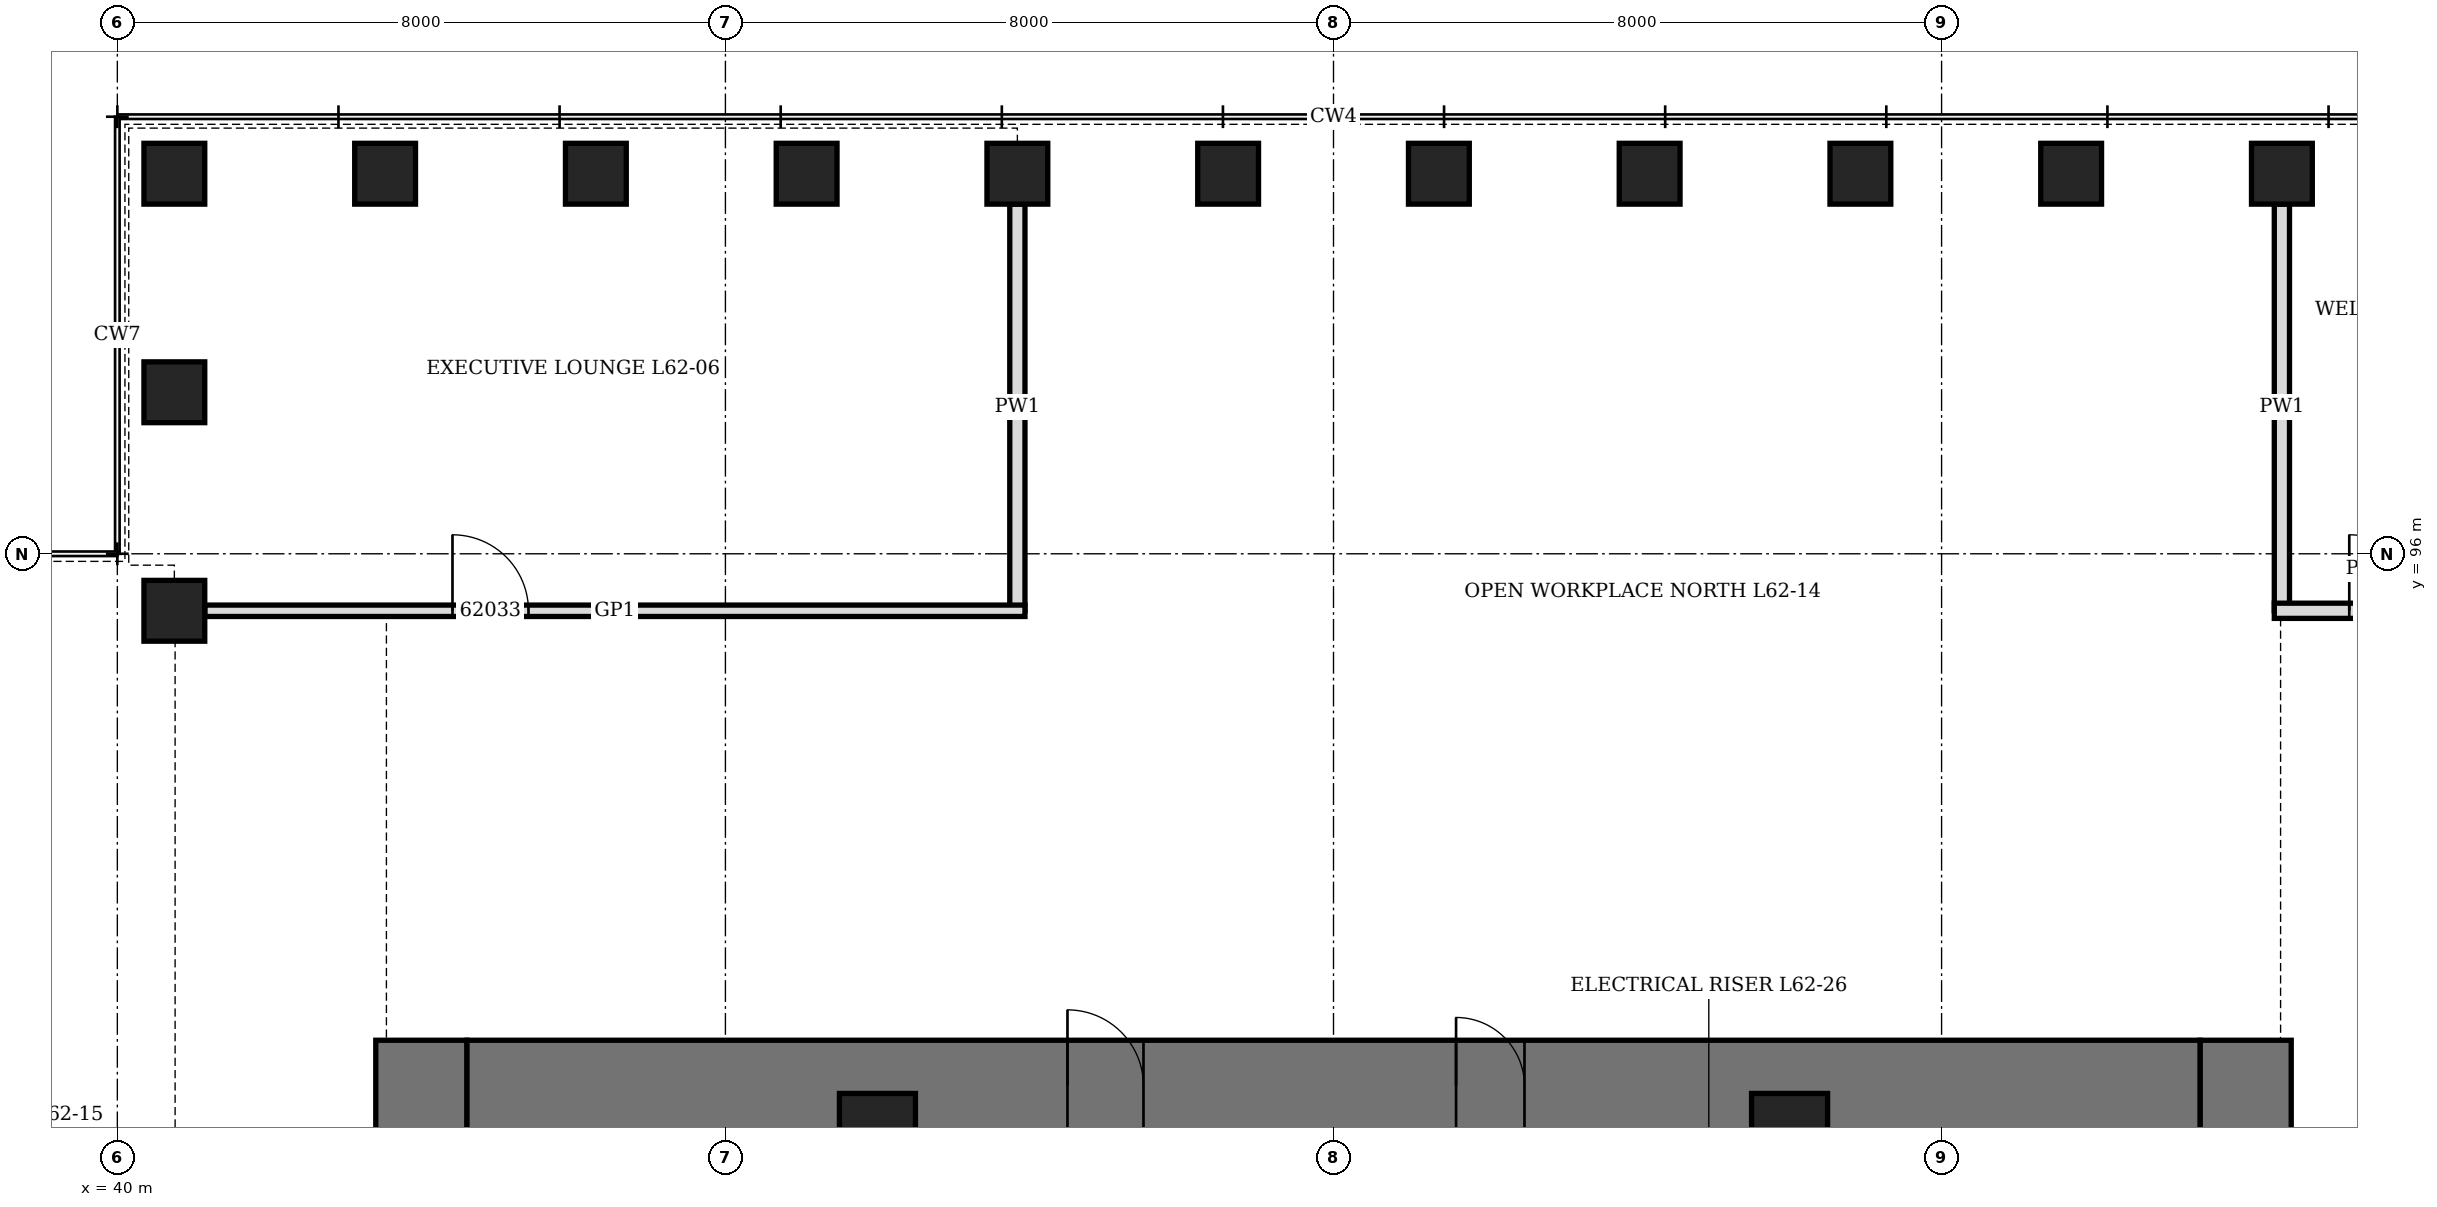
"""IFC4 building model, lengths in metres.
Left out: names, types, materials, properties, quantities, classifications, styles, units other than length and angle.
Written with IfcOpenShell. Run it as: python <this file> out.ifc"""

import sys

from ifc_helpers import new_model, si_unit, direction, frame, frame_2d, origin, origin_2d, place, context, subcontext, project, spatial, rectangle, hollow_rectangle, extrude, element, fill, save


model = new_model("IFC4")
c1 = context("Model", 3, precision=1e-05, world=origin(), true_north=direction((0.0, 1.0)))
c2 = subcontext(c1, "Body", "Model", "MODEL_VIEW")
j1 = project(units=[si_unit("LENGTHUNIT", "METRE"), si_unit("PLANEANGLEUNIT", "RADIAN")], contexts=[c1])
p1 = place(None, origin())
s1 = spatial("IfcSite", under=j1, at=p1, CompositionType="ELEMENT")
p2 = place(p1, origin())
s2 = spatial("IfcBuilding", under=s1, at=p2, CompositionType="ELEMENT")
p3 = place(p2, frame((0.0, 0.0, 275.5)))
s3 = spatial("IfcBuildingStorey", under=s2, at=p3, CompositionType="ELEMENT", Elevation=275.5)
for number, where, z_axis, x_axis in (
    (1, (68.477, 101.0, 0.0), (0.0, 0.0, 1.0), (1.0, 0.0, 0.0)),
    (2, (65.705, 101.0, 0.0), (0.0, 0.0, 1.0), (1.0, 0.0, 0.0)),
    (3, (62.932, 101.0, 0.0), (0.0, 0.0, 1.0), (1.0, 0.0, 0.0)),
    (4, (60.159, 101.0, 0.0), (0.0, 0.0, 1.0), (1.0, 0.0, 0.0)),
    (5, (57.386, 101.0, 0.0), (0.0, 0.0, 1.0), (1.0, 0.0, 0.0)),
    (6, (54.614, 101.0, 0.0), (0.0, 0.0, 1.0), (1.0, 0.0, 0.0)),
    (7, (51.841, 101.0, 0.0), (0.0, 0.0, 1.0), (1.0, 0.0, 0.0)),
    (8, (49.068, 101.0, 0.0), (0.0, 0.0, 1.0), (1.0, 0.0, 0.0)),
    (9, (46.295, 101.0, 0.0), (0.0, 0.0, 1.0), (1.0, 0.0, 0.0)),
    (10, (43.523, 101.0, 0.0), (0.0, 0.0, 1.0), (1.0, 0.0, 0.0)),
    (11, (40.75, 101.0, 0.0), (0.0, 0.0, 1.0), (0.0, 1.0, 0.0)),
    (12, (40.75, 98.125, 0.0), (0.0, 0.0, 1.0), (0.0, 1.0, 0.0)),
    (13, (40.75, 95.25, 0.0), (0.0, 0.0, 1.0), (1.0, 0.0, 0.0)),
):
    element("IfcColumn", number, at=place(p3, frame(where, z_axis=z_axis, x_axis=x_axis)), inside=s3, PredefinedType="COLUMN", context=c2, shape_type="SweptSolid", body=[
        extrude(hollow_rectangle(XDim=0.8, YDim=0.8, WallThickness=0.1, at=origin_2d()), origin(), (0.0, 0.0, 1.0), 3.95),
    ])
p4 = place(p3, frame((44.0, 70.4, 0.0), z_axis=(0.0, 0.0, 1.0), x_axis=(0.0, 1.0, 0.0)))
e14 = element("IfcWall", 14, at=p4, inside=s3, PredefinedType="SHEAR", context=c2, shape_type="SweptSolid", body=[
    extrude(rectangle(XDim=19.2, YDim=1.2, at=frame_2d((9.6, 0.0))), origin(), (0.0, 0.0, 1.0), 4.2),
])
p5 = place(p4, frame((8.6, 0.0, 0.0)))
e15 = element("IfcOpeningElement", 15, at=p5, cuts=e14, PredefinedType="OPENING", context=c2, shape_type="SweptSolid", body=[
    extrude(rectangle(XDim=2.0, YDim=2.4, at=frame_2d((1.0, 1.2))), frame((0.0, 0.61, 0.0), z_axis=(0.0, -1.0, 0.0), x_axis=(1.0, 0.0, 0.0)), (0.0, 0.0, 1.0), 1.22),
])
p6 = place(p3, frame((68.0, 70.4, 0.0), z_axis=(0.0, 0.0, 1.0), x_axis=(0.0, 1.0, 0.0)))
e16 = element("IfcWall", 16, at=p6, inside=s3, PredefinedType="SHEAR", context=c2, shape_type="SweptSolid", body=[
    extrude(rectangle(XDim=19.2, YDim=1.2, at=frame_2d((9.6, 0.0))), origin(), (0.0, 0.0, 1.0), 4.2),
])
p7 = place(p6, frame((8.6, 0.0, 0.0)))
e17 = element("IfcOpeningElement", 17, at=p7, cuts=e16, PredefinedType="OPENING", context=c2, shape_type="SweptSolid", body=[
    extrude(rectangle(XDim=2.0, YDim=2.4, at=frame_2d((1.0, 1.2))), frame((0.0, 0.61, 0.0), z_axis=(0.0, -1.0, 0.0), x_axis=(1.0, 0.0, 0.0)), (0.0, 0.0, 1.0), 1.22),
])
p8 = place(p3, frame((44.6, 89.0, 0.0), z_axis=(0.0, 0.0, 1.0), x_axis=(1.0, 0.0, 0.0)))
e18 = element("IfcWall", 18, at=p8, inside=s3, PredefinedType="SHEAR", context=c2, shape_type="SweptSolid", body=[
    extrude(rectangle(XDim=22.8, YDim=1.2, at=frame_2d((11.4, 0.0))), origin(), (0.0, 0.0, 1.0), 4.2),
])
p9 = place(p8, frame((7.9, 0.0, 0.0)))
e19 = element("IfcOpeningElement", 19, at=p9, cuts=e18, PredefinedType="OPENING", context=c2, shape_type="SweptSolid", body=[
    extrude(rectangle(XDim=1.0, YDim=2.1, at=frame_2d((0.5, 1.05))), frame((0.0, 0.61, 0.0), z_axis=(0.0, -1.0, 0.0), x_axis=(1.0, 0.0, 0.0)), (0.0, 0.0, 1.0), 1.22),
])
p10 = place(p8, frame((13.012, 0.0, 0.0)))
e20 = element("IfcOpeningElement", 20, at=p10, cuts=e18, PredefinedType="OPENING", context=c2, shape_type="SweptSolid", body=[
    extrude(rectangle(XDim=0.9, YDim=2.1, at=frame_2d((0.45, 1.05))), frame((0.0, 0.61, 0.0), z_axis=(0.0, -1.0, 0.0), x_axis=(1.0, 0.0, 0.0)), (0.0, 0.0, 1.0), 1.22),
])
for number, where, z_axis, x_axis in (
    (21, (50.0, 88.4, 0.0), (0.0, 0.0, 1.0), (1.0, 0.0, 0.0)),
    (22, (62.0, 88.4, 0.0), (0.0, 0.0, 1.0), (1.0, 0.0, 0.0)),
):
    element("IfcColumn", number, at=place(p3, frame(where, z_axis=z_axis, x_axis=x_axis)), inside=s3, PredefinedType="COLUMN", context=c2, shape_type="SweptSolid", body=[
        extrude(hollow_rectangle(XDim=1.0, YDim=1.0, WallThickness=0.15, at=origin_2d()), origin(), (0.0, 0.0, 1.0), 4.2),
    ])
p11 = place(p3, frame((51.841, 95.25, 0.0), z_axis=(0.0, 0.0, 1.0), x_axis=(0.0, 1.0, 0.0)))
e23 = element("IfcWall", 23, at=p11, inside=s3, PredefinedType="PARTITIONING", context=c2, shape_type="SweptSolid", body=[
    extrude(rectangle(XDim=5.35, YDim=0.2, at=frame_2d((2.675, 0.0))), origin(), (0.0, 0.0, 1.0), 1.95),
])
p12 = place(p3, frame((68.477, 95.25, 0.0), z_axis=(0.0, 0.0, 1.0), x_axis=(0.0, 1.0, 0.0)))
e24 = element("IfcWall", 24, at=p12, inside=s3, PredefinedType="PARTITIONING", context=c2, shape_type="SweptSolid", body=[
    extrude(rectangle(XDim=5.35, YDim=0.2, at=frame_2d((2.675, 0.0))), origin(), (0.0, 0.0, 1.0), 2.45),
])
p13 = place(p3, frame((41.15, 95.25, 0.0), z_axis=(0.0, 0.0, 1.0), x_axis=(1.0, 0.0, 0.0)))
e25 = element("IfcWall", 25, at=p13, inside=s3, PredefinedType="PARTITIONING", context=c2, shape_type="SweptSolid", body=[
    extrude(rectangle(XDim=10.791, YDim=0.15, at=frame_2d((5.396, 0.0))), origin(), (0.0, 0.0, 1.0), 2.45),
])
p14 = place(p13, frame((3.259, 0.0, 0.0)))
e26 = element("IfcOpeningElement", 26, at=p14, cuts=e25, PredefinedType="OPENING", context=c2, shape_type="SweptSolid", body=[
    extrude(rectangle(XDim=1.0, YDim=2.4, at=frame_2d((0.5, 1.2))), frame((0.0, 0.085, 0.0), z_axis=(0.0, -1.0, 0.0), x_axis=(1.0, 0.0, 0.0)), (0.0, 0.0, 1.0), 0.17),
])
p15 = place(p3, frame((68.377, 95.25, 0.0), z_axis=(0.0, 0.0, 1.0), x_axis=(1.0, 0.0, 0.0)))
e27 = element("IfcWall", 27, at=p15, inside=s3, PredefinedType="PARTITIONING", context=c2, shape_type="SweptSolid", body=[
    extrude(rectangle(XDim=2.473, YDim=0.2, at=frame_2d((1.236, 0.0))), origin(), (0.0, 0.0, 1.0), 3.95),
])
p16 = place(p15, frame((0.986, 0.0, 0.0)))
e28 = element("IfcOpeningElement", 28, at=p16, cuts=e27, PredefinedType="OPENING", context=c2, shape_type="SweptSolid", body=[
    extrude(rectangle(XDim=1.0, YDim=2.1, at=frame_2d((0.5, 1.05))), frame((0.0, 0.11, 0.0), z_axis=(0.0, -1.0, 0.0), x_axis=(1.0, 0.0, 0.0)), (0.0, 0.0, 1.0), 0.22),
])
p17 = place(p9, origin())
e29 = element("IfcDoor", 29, at=p17, inside=s3, OperationType="SINGLE_SWING_LEFT", PredefinedType="DOOR", context=c2, shape_type="SweptSolid", body=[
    extrude(rectangle(XDim=1.0, YDim=2.1, at=frame_2d((0.5, 1.05))), frame((0.0, 0.35, 0.0), z_axis=(0.0, -1.0, 0.0), x_axis=(1.0, 0.0, 0.0)), (0.0, 0.0, 1.0), 0.7),
])
fill(e19, e29)
p18 = place(p10, origin())
e30 = element("IfcDoor", 30, at=p18, inside=s3, OperationType="SINGLE_SWING_LEFT", PredefinedType="DOOR", context=c2, shape_type="SweptSolid", body=[
    extrude(rectangle(XDim=0.9, YDim=2.1, at=frame_2d((0.45, 1.05))), frame((0.0, 0.35, 0.0), z_axis=(0.0, -1.0, 0.0), x_axis=(1.0, 0.0, 0.0)), (0.0, 0.0, 1.0), 0.7),
])
fill(e20, e30)
p19 = place(p14, origin())
e31 = element("IfcDoor", 31, at=p19, inside=s3, OperationType="SINGLE_SWING_RIGHT", PredefinedType="DOOR", context=c2, shape_type="SweptSolid", body=[
    extrude(rectangle(XDim=1.0, YDim=2.4, at=frame_2d((0.5, 1.2))), frame((0.0, 0.075, 0.0), z_axis=(0.0, -1.0, 0.0), x_axis=(1.0, 0.0, 0.0)), (0.0, 0.0, 1.0), 0.149),
])
fill(e26, e31)
p20 = place(p16, origin())
e32 = element("IfcDoor", 32, at=p20, inside=s3, OperationType="SINGLE_SWING_LEFT", PredefinedType="DOOR", context=c2, shape_type="SweptSolid", body=[
    extrude(rectangle(XDim=1.0, YDim=2.1, at=frame_2d((0.5, 1.05))), frame((0.0, 0.1, 0.0), z_axis=(0.0, -1.0, 0.0), x_axis=(1.0, 0.0, 0.0)), (0.0, 0.0, 1.0), 0.199),
])
fill(e28, e32)
save(model, sys.argv[1])
